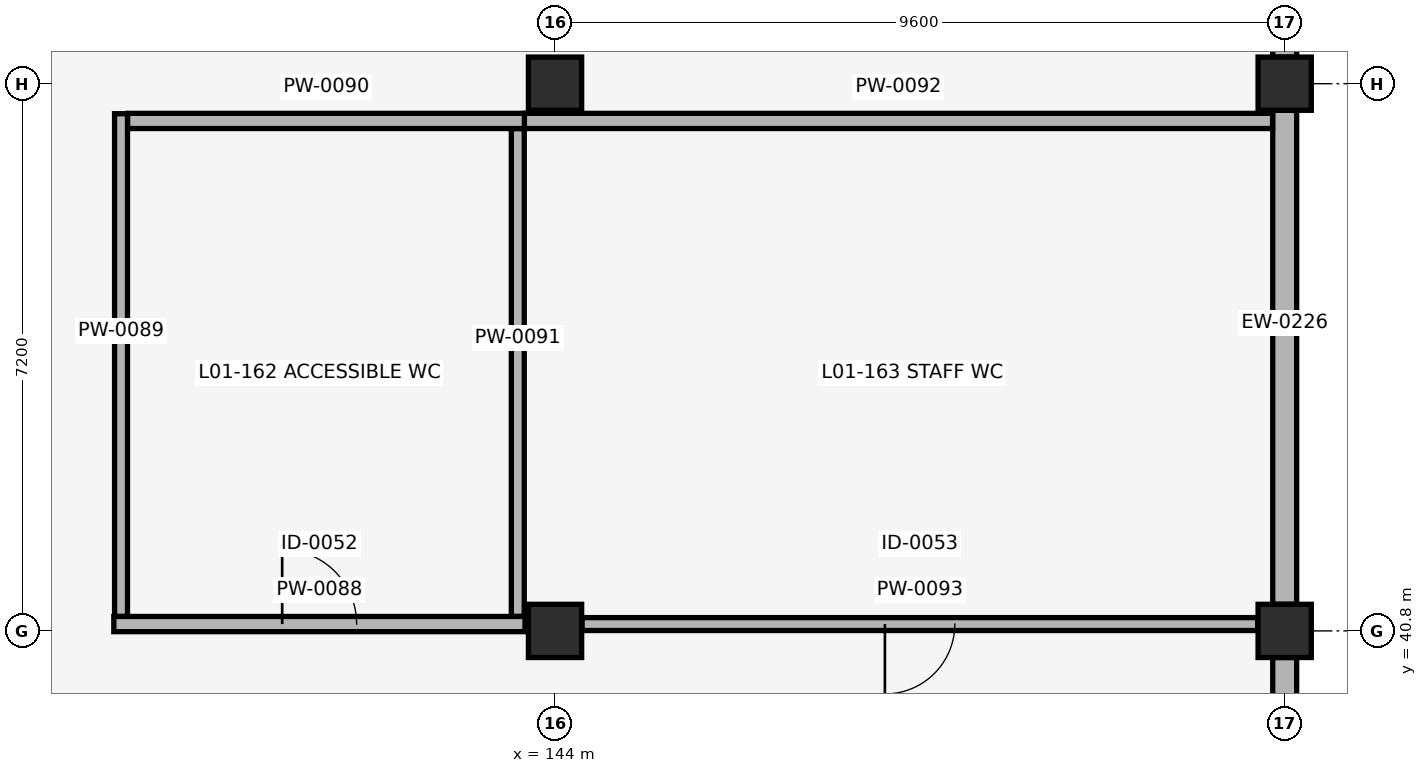
"""IFC4 building model, lengths in metres.
Left out: names, types, materials, properties, quantities, classifications, styles, units other than length and angle.
Written with IfcOpenShell. Run it as: python <this file> out.ifc"""

import sys

from ifc_helpers import new_model, si_unit, direction, frame, frame_2d, origin, origin_2d, place, context, subcontext, project, spatial, rectangle, extrude, element, fill, save


model = new_model("IFC4")
c1 = context("Model", 3, precision=1e-05, world=origin(), true_north=direction((0.0, 1.0)))
c2 = subcontext(c1, "Body", "Model", "MODEL_VIEW")
j1 = project(units=[si_unit("LENGTHUNIT", "METRE"), si_unit("PLANEANGLEUNIT", "RADIAN")], contexts=[c1])
p1 = place(None, origin())
s1 = spatial("IfcSite", under=j1, at=p1, CompositionType="ELEMENT")
p2 = place(p1, origin())
s2 = spatial("IfcBuilding", under=s1, at=p2, CompositionType="ELEMENT")
p3 = place(p2, frame((0.0, 0.0, 4.42)))
s3 = spatial("IfcBuildingStorey", under=s2, at=p3, CompositionType="ELEMENT", Elevation=4.42)
for number, where, z_axis, x_axis in (
    (1, (144.0, 40.8, 0.0), (0.0, 0.0, 1.0), (1.0, 0.0, 0.0)),
    (2, (144.0, 48.0, 0.0), (0.0, 0.0, 1.0), (1.0, 0.0, 0.0)),
    (3, (153.6, 40.8, 0.0), (0.0, 0.0, 1.0), (1.0, 0.0, 0.0)),
    (4, (153.6, 48.0, 0.0), (0.0, 0.0, 1.0), (1.0, 0.0, 0.0)),
):
    element("IfcColumn", number, at=place(p3, frame(where, z_axis=z_axis, x_axis=x_axis)), inside=s3, PredefinedType="COLUMN", context=c2, shape_type="SweptSolid", body=[
        extrude(rectangle(XDim=0.7, YDim=0.7, at=origin_2d()), origin(), (0.0, 0.0, 1.0), 4.08),
    ])
for number, where, z_axis, x_axis in (
    (5, (153.6, 33.95, 0.0), (0.0, 0.0, 1.0), (0.0, 1.0, 0.0)),
    (6, (153.6, 41.15, 0.0), (0.0, 0.0, 1.0), (0.0, 1.0, 0.0)),
):
    element("IfcWall", number, at=place(p3, frame(where, z_axis=z_axis, x_axis=x_axis)), inside=s3, PredefinedType="SOLIDWALL", context=c2, shape_type="SweptSolid", body=[
        extrude(rectangle(XDim=6.5, YDim=0.315, at=frame_2d((3.25, 0.0))), origin(), (0.0, 0.0, 1.0), 3.06),
    ])
p4 = place(p3, frame((153.6, 48.35, 0.0), z_axis=(0.0, 0.0, 1.0), x_axis=(0.0, 1.0, 0.0)))
e7 = element("IfcWall", 7, at=p4, inside=s3, PredefinedType="SOLIDWALL", context=c2, shape_type="SweptSolid", body=[
    extrude(rectangle(XDim=6.5, YDim=0.315, at=frame_2d((3.25, 0.0))), origin(), (0.0, 0.0, 1.0), 3.05),
])
p5 = place(p3, frame((138.195, 40.89, 0.0), z_axis=(0.0, 0.0, 1.0), x_axis=(1.0, 0.0, 0.0)))
e8 = element("IfcWall", 8, at=p5, inside=s3, PredefinedType="PLUMBINGWALL", context=c2, shape_type="SweptSolid", body=[
    extrude(rectangle(XDim=5.41, YDim=0.2, at=frame_2d((2.705, 0.0))), origin(), (0.0, 0.0, 1.0), 3.06),
])
p6 = place(p5, frame((2.215, 0.0, 0.0)))
e9 = element("IfcOpeningElement", 9, at=p6, cuts=e8, PredefinedType="OPENING", context=c2, shape_type="SweptSolid", body=[
    extrude(rectangle(XDim=0.98, YDim=2.08, at=frame_2d((0.49, 1.04))), frame((0.0, 0.11, 0.0), z_axis=(0.0, -1.0, 0.0), x_axis=(1.0, 0.0, 0.0)), (0.0, 0.0, 1.0), 0.22),
])
p7 = place(p3, frame((138.29, 40.992, 0.0), z_axis=(0.0, 0.0, 1.0), x_axis=(0.0, 1.0, 0.0)))
e10 = element("IfcWall", 10, at=p7, inside=s3, PredefinedType="PLUMBINGWALL", context=c2, shape_type="SweptSolid", body=[
    extrude(rectangle(XDim=6.613, YDim=0.17, at=frame_2d((3.307, 0.0))), origin(), (0.0, 0.0, 1.0), 3.06),
])
p8 = place(p3, frame((138.377, 47.51, 0.0), z_axis=(0.0, 0.0, 1.0), x_axis=(1.0, 0.0, 0.0)))
e11 = element("IfcWall", 11, at=p8, inside=s3, PredefinedType="PLUMBINGWALL", context=c2, shape_type="SweptSolid", body=[
    extrude(rectangle(XDim=5.228, YDim=0.2, at=frame_2d((2.614, 0.0))), origin(), (0.0, 0.0, 1.0), 3.12),
])
p9 = place(p3, frame((143.51, 40.992, 0.0), z_axis=(0.0, 0.0, 1.0), x_axis=(0.0, 1.0, 0.0)))
e12 = element("IfcWall", 12, at=p9, inside=s3, PredefinedType="PLUMBINGWALL", context=c2, shape_type="SweptSolid", body=[
    extrude(rectangle(XDim=6.416, YDim=0.17, at=frame_2d((3.208, 0.0))), origin(), (0.0, 0.0, 1.0), 3.06),
])
p10 = place(p3, frame((143.597, 47.51, 0.0), z_axis=(0.0, 0.0, 1.0), x_axis=(1.0, 0.0, 0.0)))
e13 = element("IfcWall", 13, at=p10, inside=s3, PredefinedType="PLUMBINGWALL", context=c2, shape_type="SweptSolid", body=[
    extrude(rectangle(XDim=9.844, YDim=0.2, at=frame_2d((4.922, 0.0))), origin(), (0.0, 0.0, 1.0), 3.06),
])
p11 = place(p3, frame((144.355, 40.89, 0.0), z_axis=(0.0, 0.0, 1.0), x_axis=(1.0, 0.0, 0.0)))
e14 = element("IfcWall", 14, at=p11, inside=s3, PredefinedType="PLUMBINGWALL", context=c2, shape_type="SweptSolid", body=[
    extrude(rectangle(XDim=8.89, YDim=0.17, at=frame_2d((4.445, 0.0))), origin(), (0.0, 0.0, 1.0), 3.06),
])
p12 = place(p11, frame((3.985, 0.0, 0.0)))
e15 = element("IfcOpeningElement", 15, at=p12, cuts=e14, PredefinedType="OPENING", context=c2, shape_type="SweptSolid", body=[
    extrude(rectangle(XDim=0.92, YDim=2.08, at=frame_2d((0.46, 1.04))), frame((0.0, 0.095, 0.0), z_axis=(0.0, -1.0, 0.0), x_axis=(1.0, 0.0, 0.0)), (0.0, 0.0, 1.0), 0.19),
])
p13 = place(p6, origin())
e16 = element("IfcDoor", 16, at=p13, inside=s3, OperationType="SINGLE_SWING_LEFT", PredefinedType="DOOR", context=c2, shape_type="SweptSolid", body=[
    extrude(rectangle(XDim=0.98, YDim=2.08, at=frame_2d((0.49, 1.04))), frame((0.0, 0.025, 0.0), z_axis=(0.0, -1.0, 0.0), x_axis=(1.0, 0.0, 0.0)), (0.0, 0.0, 1.0), 0.05),
])
fill(e9, e16)
p14 = place(p12, origin())
e17 = element("IfcDoor", 17, at=p14, inside=s3, OperationType="SINGLE_SWING_RIGHT", PredefinedType="DOOR", context=c2, shape_type="SweptSolid", body=[
    extrude(rectangle(XDim=0.92, YDim=2.08, at=frame_2d((0.46, 1.04))), frame((0.0, 0.025, 0.0), z_axis=(0.0, -1.0, 0.0), x_axis=(1.0, 0.0, 0.0)), (0.0, 0.0, 1.0), 0.05),
])
fill(e15, e17)
save(model, sys.argv[1])
